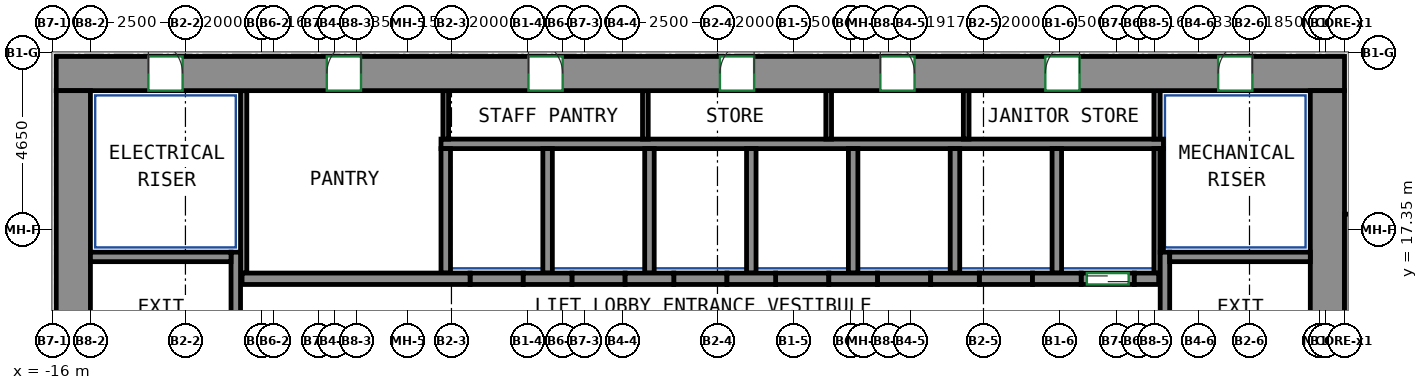
"""IFC4 building model, lengths in metres.
Left out: names, types, materials, properties, quantities, classifications, styles, units other than length and angle.
Written with IfcOpenShell. Run it as: python <this file> out.ifc"""

import sys

from ifc_helpers import new_model, si_unit, direction, frame, frame_2d, origin, place, context, subcontext, project, spatial, rectangle, extrude, source, transform, mapped, element, fill, save


model = new_model("IFC4")
c1 = context("Model", 3, precision=1e-05, world=origin(), true_north=direction((0.0, 1.0)))
c2 = subcontext(c1, "Body", "Model", "MODEL_VIEW")
j1 = project(units=[si_unit("LENGTHUNIT", "METRE"), si_unit("PLANEANGLEUNIT", "RADIAN")], contexts=[c1])
p1 = place(None, origin())
s1 = spatial("IfcSite", under=j1, at=p1, CompositionType="ELEMENT")
p2 = place(p1, origin())
s2 = spatial("IfcBuilding", under=s1, at=p2, CompositionType="ELEMENT")
p3 = place(p2, frame((0.0, 0.0, 120.6)))
s3 = spatial("IfcBuildingStorey", under=s2, at=p3, CompositionType="ELEMENT", Elevation=120.6)
m1 = source(origin(), c2, "Body", "SweptSolid", [
    extrude(rectangle(XDim=33.9, YDim=0.9, at=frame_2d((16.95, 0.0))), origin(), (0.0, 0.0, 1.0), 3.72),
])
p4 = place(p3, frame((-15.9, 21.45, 0.0), z_axis=(0.0, 0.0, 1.0), x_axis=(1.0, 0.0, 0.0)))
e1 = element("IfcWall", 1, at=p4, inside=s3, PredefinedType="SHEAR", context=c2, shape_type="MappedRepresentation", body=[
    mapped(m1, transform((0.0, 0.0, 0.0))),
])
p5 = place(p4, frame((7.12, 0.0, 0.0)))
e2 = element("IfcOpeningElement", 2, at=p5, cuts=e1, PredefinedType="OPENING", context=c2, shape_type="SweptSolid", body=[
    extrude(rectangle(XDim=0.9, YDim=2.1, at=frame_2d((0.45, 1.05))), frame((0.0, 0.46, 0.0), z_axis=(0.0, -1.0, 0.0), x_axis=(1.0, 0.0, 0.0)), (0.0, 0.0, 1.0), 0.92),
])
p6 = place(p4, frame((12.427, 0.0, 0.0)))
e3 = element("IfcOpeningElement", 3, at=p6, cuts=e1, PredefinedType="OPENING", context=c2, shape_type="SweptSolid", body=[
    extrude(rectangle(XDim=0.9, YDim=2.1, at=frame_2d((0.45, 1.05))), frame((0.0, 0.46, 0.0), z_axis=(0.0, -1.0, 0.0), x_axis=(1.0, 0.0, 0.0)), (0.0, 0.0, 1.0), 0.92),
])
p7 = place(p4, frame((17.465, 0.0, 0.0)))
e4 = element("IfcOpeningElement", 4, at=p7, cuts=e1, PredefinedType="OPENING", context=c2, shape_type="SweptSolid", body=[
    extrude(rectangle(XDim=0.9, YDim=2.1, at=frame_2d((0.45, 1.05))), frame((0.0, 0.46, 0.0), z_axis=(0.0, -1.0, 0.0), x_axis=(1.0, 0.0, 0.0)), (0.0, 0.0, 1.0), 0.92),
])
p8 = place(p4, frame((21.686, 0.0, 0.0)))
e5 = element("IfcOpeningElement", 5, at=p8, cuts=e1, PredefinedType="OPENING", context=c2, shape_type="SweptSolid", body=[
    extrude(rectangle(XDim=0.9, YDim=2.1, at=frame_2d((0.45, 1.05))), frame((0.0, 0.46, 0.0), z_axis=(0.0, -1.0, 0.0), x_axis=(1.0, 0.0, 0.0)), (0.0, 0.0, 1.0), 0.92),
])
p9 = place(p4, frame((26.027, 0.0, 0.0)))
e6 = element("IfcOpeningElement", 6, at=p9, cuts=e1, PredefinedType="OPENING", context=c2, shape_type="SweptSolid", body=[
    extrude(rectangle(XDim=0.9, YDim=2.1, at=frame_2d((0.45, 1.05))), frame((0.0, 0.46, 0.0), z_axis=(0.0, -1.0, 0.0), x_axis=(1.0, 0.0, 0.0)), (0.0, 0.0, 1.0), 0.92),
])
p10 = place(p4, frame((2.425, 0.0, 0.0)))
e7 = element("IfcOpeningElement", 7, at=p10, cuts=e1, PredefinedType="OPENING", context=c2, shape_type="SweptSolid", body=[
    extrude(rectangle(XDim=0.9, YDim=2.1, at=frame_2d((0.45, 1.05))), frame((0.0, 0.46, 0.0), z_axis=(0.0, -1.0, 0.0), x_axis=(1.0, 0.0, 0.0)), (0.0, 0.0, 1.0), 0.92),
])
p11 = place(p4, frame((30.575, 0.0, 0.0)))
e8 = element("IfcOpeningElement", 8, at=p11, cuts=e1, PredefinedType="OPENING", context=c2, shape_type="SweptSolid", body=[
    extrude(rectangle(XDim=0.9, YDim=2.1, at=frame_2d((0.45, 1.05))), frame((0.0, 0.46, 0.0), z_axis=(0.0, -1.0, 0.0), x_axis=(1.0, 0.0, 0.0)), (0.0, 0.0, 1.0), 0.92),
])
m2 = source(origin(), c2, "Body", "SweptSolid", [
    extrude(rectangle(XDim=12.0, YDim=0.9, at=frame_2d((6.0, 0.0))), origin(), (0.0, 0.0, 1.0), 3.72),
])
for number, where, z_axis, x_axis in (
    (9, (-15.45, 9.0, 0.0), (0.0, 0.0, 1.0), (0.0, 1.0, 0.0)),
    (10, (17.55, 9.0, 0.0), (0.0, 0.0, 1.0), (0.0, 1.0, 0.0)),
):
    element("IfcWall", number, at=place(p3, frame(where, z_axis=z_axis, x_axis=x_axis)), inside=s3, PredefinedType="SHEAR", context=c2, shape_type="MappedRepresentation", body=[
        mapped(m2, transform((0.0, 0.0, 0.0))),
    ])
m3 = source(origin(), c2, "Body", "SweptSolid", [
    extrude(rectangle(XDim=7.75, YDim=0.25, at=frame_2d((3.875, 0.0))), origin(), (0.0, 0.0, 1.0), 3.72),
])
p12 = place(p3, frame((-11.175, 9.0, 0.0), z_axis=(0.0, 0.0, 1.0), x_axis=(0.0, 1.0, 0.0)))
e11 = element("IfcWall", 11, at=p12, inside=s3, PredefinedType="SHEAR", context=c2, shape_type="MappedRepresentation", body=[
    mapped(m3, transform((0.0, 0.0, 0.0))),
])
m4 = source(origin(), c2, "Body", "SweptSolid", [
    extrude(rectangle(XDim=3.7, YDim=0.25, at=frame_2d((1.85, 0.0))), origin(), (0.0, 0.0, 1.0), 3.72),
])
p13 = place(p3, frame((-15.0, 16.625, 0.0), z_axis=(0.0, 0.0, 1.0), x_axis=(1.0, 0.0, 0.0)))
e12 = element("IfcWall", 12, at=p13, inside=s3, PredefinedType="SHEAR", context=c2, shape_type="MappedRepresentation", body=[
    mapped(m4, transform((0.0, 0.0, 0.0))),
])
p14 = place(p3, frame((13.275, 9.0, 0.0), z_axis=(0.0, 0.0, 1.0), x_axis=(0.0, 1.0, 0.0)))
e13 = element("IfcWall", 13, at=p14, inside=s3, PredefinedType="SHEAR", context=c2, shape_type="MappedRepresentation", body=[
    mapped(m3, transform((0.0, 0.0, 0.0))),
])
m5 = source(origin(), c2, "Body", "SweptSolid", [
    extrude(rectangle(XDim=3.7, YDim=0.25, at=frame_2d((1.85, 0.0))), origin(), (0.0, 0.0, 1.0), 3.72),
])
p15 = place(p3, frame((13.4, 16.625, 0.0), z_axis=(0.0, 0.0, 1.0), x_axis=(1.0, 0.0, 0.0)))
e14 = element("IfcWall", 14, at=p15, inside=s3, PredefinedType="SHEAR", context=c2, shape_type="MappedRepresentation", body=[
    mapped(m5, transform((0.0, 0.0, 0.0))),
])
m6 = source(origin(), c2, "Body", "SweptSolid", [
    extrude(rectangle(XDim=8.0, YDim=0.35, at=frame_2d((4.0, 0.0))), origin(), (0.0, 0.0, 1.0), 3.72),
])
p16 = place(p3, frame((18.175, 9.75, 0.0), z_axis=(0.0, 0.0, 1.0), x_axis=(0.0, 1.0, 0.0)))
e15 = element("IfcWall", 15, at=p16, inside=s3, PredefinedType="SHEAR", context=c2, shape_type="MappedRepresentation", body=[
    mapped(m6, transform((0.0, 0.0, 0.0))),
])
m7 = source(origin(), c2, "Body", "SweptSolid", [
    extrude(rectangle(XDim=6.0, YDim=0.3, at=frame_2d((3.0, 0.0))), origin(), (0.0, 0.0, 1.0), 3.72),
])
p17 = place(p3, frame((-11.01, 16.05, 0.0), z_axis=(0.0, 0.0, 1.0), x_axis=(1.0, 0.0, 0.0)))
e16 = element("IfcWall", 16, at=p17, inside=s3, PredefinedType="SHEAR", context=c2, shape_type="MappedRepresentation", body=[
    mapped(m7, transform((0.0, 0.0, 0.0))),
])
m8 = source(origin(), c2, "Body", "SweptSolid", [
    extrude(rectangle(XDim=1.28, YDim=0.3, at=frame_2d((0.64, 0.0))), origin(), (0.0, 0.0, 1.0), 3.72),
])
for number, where, z_axis, x_axis in (
    (17, (-3.61, 16.05, 0.0), (0.0, 0.0, 1.0), (1.0, 0.0, 0.0)),
    (18, (-0.93, 16.05, 0.0), (0.0, 0.0, 1.0), (1.0, 0.0, 0.0)),
    (19, (1.75, 16.05, 0.0), (0.0, 0.0, 1.0), (1.0, 0.0, 0.0)),
    (20, (4.43, 16.05, 0.0), (0.0, 0.0, 1.0), (1.0, 0.0, 0.0)),
):
    element("IfcWall", number, at=place(p3, frame(where, z_axis=z_axis, x_axis=x_axis)), inside=s3, PredefinedType="SHEAR", context=c2, shape_type="MappedRepresentation", body=[
        mapped(m8, transform((0.0, 0.0, 0.0))),
    ])
m9 = source(origin(), c2, "Body", "SweptSolid", [
    extrude(rectangle(XDim=1.28, YDim=0.3, at=frame_2d((0.64, 0.0))), origin(), (0.0, 0.0, 1.0), 3.72),
])
p18 = place(p3, frame((7.11, 16.05, 0.0), z_axis=(0.0, 0.0, 1.0), x_axis=(1.0, 0.0, 0.0)))
e21 = element("IfcWall", 21, at=p18, inside=s3, PredefinedType="SHEAR", context=c2, shape_type="MappedRepresentation", body=[
    mapped(m9, transform((0.0, 0.0, 0.0))),
])
p19 = place(p3, frame((9.79, 16.05, 0.0), z_axis=(0.0, 0.0, 1.0), x_axis=(1.0, 0.0, 0.0)))
e22 = element("IfcWall", 22, at=p19, inside=s3, PredefinedType="SHEAR", context=c2, shape_type="MappedRepresentation", body=[
    mapped(m8, transform((0.0, 0.0, 0.0))),
])
m10 = source(origin(), c2, "Body", "SweptSolid", [
    extrude(rectangle(XDim=0.64, YDim=0.3, at=frame_2d((0.32, 0.0))), origin(), (0.0, 0.0, 1.0), 3.72),
])
p20 = place(p3, frame((12.47, 16.05, 0.0), z_axis=(0.0, 0.0, 1.0), x_axis=(1.0, 0.0, 0.0)))
e23 = element("IfcWall", 23, at=p20, inside=s3, PredefinedType="SHEAR", context=c2, shape_type="MappedRepresentation", body=[
    mapped(m10, transform((0.0, 0.0, 0.0))),
])
m11 = source(origin(), c2, "Body", "SweptSolid", [
    extrude(rectangle(XDim=1.4, YDim=0.3, at=frame_2d((0.7, 0.0))), origin(), (0.0, 0.0, 1.0), 3.72),
])
p21 = place(p3, frame((11.07, 16.05, 0.0), z_axis=(0.0, 0.0, 1.0), x_axis=(1.0, 0.0, 0.0)))
e24 = element("IfcWall", 24, at=p21, inside=s3, PredefinedType="PARTITIONING", context=c2, shape_type="MappedRepresentation", body=[
    mapped(m11, transform((0.0, 0.0, 0.0))),
])
p22 = place(p21, frame((0.15, 0.0, 0.0)))
e25 = element("IfcOpeningElement", 25, at=p22, cuts=e24, PredefinedType="OPENING", context=c2, shape_type="SweptSolid", body=[
    extrude(rectangle(XDim=1.1, YDim=2.1, at=frame_2d((0.55, 1.05))), frame((0.0, 0.16, 0.0), z_axis=(0.0, -1.0, 0.0), x_axis=(1.0, 0.0, 0.0)), (0.0, 0.0, 1.0), 0.32),
])
p23 = place(p3, frame((-5.01, 16.05, 0.0), z_axis=(0.0, 0.0, 1.0), x_axis=(1.0, 0.0, 0.0)))
e26 = element("IfcWall", 26, at=p23, inside=s3, PredefinedType="PARTITIONING", context=c2, shape_type="MappedRepresentation", body=[
    mapped(m11, transform((0.0, 0.0, 0.0))),
])
m12 = source(origin(), c2, "Body", "SweptSolid", [
    extrude(rectangle(XDim=1.4, YDim=0.3, at=frame_2d((0.7, 0.0))), origin(), (0.0, 0.0, 1.0), 3.72),
])
p24 = place(p3, frame((-2.33, 16.05, 0.0), z_axis=(0.0, 0.0, 1.0), x_axis=(1.0, 0.0, 0.0)))
e27 = element("IfcWall", 27, at=p24, inside=s3, PredefinedType="PARTITIONING", context=c2, shape_type="MappedRepresentation", body=[
    mapped(m12, transform((0.0, 0.0, 0.0))),
])
for number, where, z_axis, x_axis in (
    (28, (0.35, 16.05, 0.0), (0.0, 0.0, 1.0), (1.0, 0.0, 0.0)),
    (29, (3.03, 16.05, 0.0), (0.0, 0.0, 1.0), (1.0, 0.0, 0.0)),
):
    element("IfcWall", number, at=place(p3, frame(where, z_axis=z_axis, x_axis=x_axis)), inside=s3, PredefinedType="PARTITIONING", context=c2, shape_type="MappedRepresentation", body=[
        mapped(m11, transform((0.0, 0.0, 0.0))),
    ])
for number, where, z_axis, x_axis in (
    (30, (5.71, 16.05, 0.0), (0.0, 0.0, 1.0), (1.0, 0.0, 0.0)),
    (31, (8.39, 16.05, 0.0), (0.0, 0.0, 1.0), (1.0, 0.0, 0.0)),
):
    element("IfcWall", number, at=place(p3, frame(where, z_axis=z_axis, x_axis=x_axis)), inside=s3, PredefinedType="PARTITIONING", context=c2, shape_type="MappedRepresentation", body=[
        mapped(m12, transform((0.0, 0.0, 0.0))),
    ])
m13 = source(origin(), c2, "Body", "SweptSolid", [
    extrude(rectangle(XDim=19.01, YDim=0.25, at=frame_2d((9.505, 0.0))), origin(), (0.0, 0.0, 1.0), 3.72),
])
p25 = place(p3, frame((-5.775, 19.6, 0.0), z_axis=(0.0, 0.0, 1.0), x_axis=(1.0, 0.0, 0.0)))
e32 = element("IfcWall", 32, at=p25, inside=s3, PredefinedType="PARTITIONING", context=c2, shape_type="MappedRepresentation", body=[
    mapped(m13, transform((0.0, 0.0, 0.0))),
])
m14 = source(origin(), c2, "Body", "SweptSolid", [
    extrude(rectangle(XDim=3.275, YDim=0.165, at=frame_2d((1.638, 0.0))), origin(), (0.0, 0.0, 1.0), 3.72),
])
p26 = place(p3, frame((13.067, 16.2, 0.0), z_axis=(0.0, 0.0, 1.0), x_axis=(0.0, 1.0, 0.0)))
e33 = element("IfcWall", 33, at=p26, inside=s3, PredefinedType="PARTITIONING", context=c2, shape_type="MappedRepresentation", body=[
    mapped(m14, transform((0.0, 0.0, 0.0))),
])
m15 = source(origin(), c2, "Body", "SweptSolid", [
    extrude(rectangle(XDim=1.275, YDim=0.165, at=frame_2d((0.637, 0.0))), origin(), (0.0, 0.0, 1.0), 3.72),
])
p27 = place(p3, frame((13.067, 19.725, 0.0), z_axis=(0.0, 0.0, 1.0), x_axis=(0.0, 1.0, 0.0)))
e34 = element("IfcWall", 34, at=p27, inside=s3, PredefinedType="PARTITIONING", context=c2, shape_type="MappedRepresentation", body=[
    mapped(m15, transform((0.0, 0.0, 0.0))),
])
m16 = source(origin(), c2, "Body", "SweptSolid", [
    extrude(rectangle(XDim=4.8, YDim=0.165, at=frame_2d((2.4, 0.0))), origin(), (0.0, 0.0, 1.0), 3.72),
])
p28 = place(p3, frame((-10.968, 16.2, 0.0), z_axis=(0.0, 0.0, 1.0), x_axis=(0.0, 1.0, 0.0)))
e35 = element("IfcWall", 35, at=p28, inside=s3, PredefinedType="PARTITIONING", context=c2, shape_type="MappedRepresentation", body=[
    mapped(m16, transform((0.0, 0.0, 0.0))),
])
m17 = source(origin(), c2, "Body", "SweptSolid", [
    extrude(rectangle(XDim=3.275, YDim=0.25, at=frame_2d((1.638, 0.0))), origin(), (0.0, 0.0, 1.0), 3.72),
])
p29 = place(p3, frame((10.43, 16.2, 0.0), z_axis=(0.0, 0.0, 1.0), x_axis=(0.0, 1.0, 0.0)))
e36 = element("IfcWall", 36, at=p29, inside=s3, PredefinedType="PARTITIONING", context=c2, shape_type="MappedRepresentation", body=[
    mapped(m17, transform((0.0, 0.0, 0.0))),
])
m18 = source(origin(), c2, "Body", "SweptSolid", [
    extrude(rectangle(XDim=2.725, YDim=0.085, at=frame_2d((1.363, 0.0))), origin(), (0.0, 0.0, 1.0), 3.72),
])
p30 = place(p3, frame((13.192, 16.75, 0.0), z_axis=(0.0, 0.0, 1.0), x_axis=(0.0, 1.0, 0.0)))
e37 = element("IfcWall", 37, at=p30, inside=s3, PredefinedType="PARTITIONING", context=c2, shape_type="MappedRepresentation", body=[
    mapped(m18, transform((0.0, 0.0, 0.0))),
])
for number, where, z_axis, x_axis in (
    (38, (2.39, 16.2, 0.0), (0.0, 0.0, 1.0), (0.0, 1.0, 0.0)),
    (39, (5.07, 16.2, 0.0), (0.0, 0.0, 1.0), (0.0, 1.0, 0.0)),
    (40, (7.75, 16.2, 0.0), (0.0, 0.0, 1.0), (0.0, 1.0, 0.0)),
    (41, (-0.29, 16.2, 0.0), (0.0, 0.0, 1.0), (0.0, 1.0, 0.0)),
    (42, (-2.97, 16.2, 0.0), (0.0, 0.0, 1.0), (0.0, 1.0, 0.0)),
    (43, (-5.65, 16.2, 0.0), (0.0, 0.0, 1.0), (0.0, 1.0, 0.0)),
):
    element("IfcWall", number, at=place(p3, frame(where, z_axis=z_axis, x_axis=x_axis)), inside=s3, PredefinedType="PARTITIONING", context=c2, shape_type="MappedRepresentation", body=[
        mapped(m17, transform((0.0, 0.0, 0.0))),
    ])
m19 = source(origin(), c2, "Body", "SweptSolid", [
    extrude(rectangle(XDim=1.275, YDim=0.15, at=frame_2d((0.637, 0.0))), origin(), (0.0, 0.0, 1.0), 3.72),
])
for number, where, z_axis, x_axis in (
    (44, (-5.65, 19.725, 0.0), (0.0, 0.0, 1.0), (0.0, 1.0, 0.0)),
    (45, (-0.397, 19.725, 0.0), (0.0, 0.0, 1.0), (0.0, 1.0, 0.0)),
    (46, (4.427, 19.725, 0.0), (0.0, 0.0, 1.0), (0.0, 1.0, 0.0)),
    (47, (8.045, 19.725, 0.0), (0.0, 0.0, 1.0), (0.0, 1.0, 0.0)),
):
    element("IfcWall", number, at=place(p3, frame(where, z_axis=z_axis, x_axis=x_axis)), inside=s3, PredefinedType="PARTITIONING", context=c2, shape_type="MappedRepresentation", body=[
        mapped(m19, transform((0.0, 0.0, 0.0))),
    ])
p31 = place(p22, origin())
e48 = element("IfcDoor", 48, at=p31, inside=s3, OperationType="DOUBLE_DOOR_SLIDING", PredefinedType="DOOR", context=c2, shape_type="SweptSolid", body=[
    extrude(rectangle(XDim=1.1, YDim=2.1, at=frame_2d((0.55, 1.05))), frame((0.0, 0.025, 0.0), z_axis=(0.0, -1.0, 0.0), x_axis=(1.0, 0.0, 0.0)), (0.0, 0.0, 1.0), 0.05),
])
fill(e25, e48)
p32 = place(p5, origin())
e49 = element("IfcDoor", 49, at=p32, inside=s3, OperationType="SINGLE_SWING_RIGHT", PredefinedType="DOOR", context=c2, shape_type="SweptSolid", body=[
    extrude(rectangle(XDim=0.9, YDim=2.1, at=frame_2d((0.45, 1.05))), frame((0.0, -0.305, 0.0), z_axis=(0.0, -1.0, 0.0), x_axis=(1.0, 0.0, 0.0)), (0.0, 0.0, 1.0), 0.05),
])
fill(e2, e49)
p33 = place(p6, origin())
e50 = element("IfcDoor", 50, at=p33, inside=s3, OperationType="SINGLE_SWING_LEFT", PredefinedType="DOOR", context=c2, shape_type="SweptSolid", body=[
    extrude(rectangle(XDim=0.9, YDim=2.1, at=frame_2d((0.45, 1.05))), frame((0.0, -0.305, 0.0), z_axis=(0.0, -1.0, 0.0), x_axis=(1.0, 0.0, 0.0)), (0.0, 0.0, 1.0), 0.05),
])
fill(e3, e50)
p34 = place(p7, origin())
e51 = element("IfcDoor", 51, at=p34, inside=s3, OperationType="SINGLE_SWING_RIGHT", PredefinedType="DOOR", context=c2, shape_type="SweptSolid", body=[
    extrude(rectangle(XDim=0.9, YDim=2.1, at=frame_2d((0.45, 1.05))), frame((0.0, -0.305, 0.0), z_axis=(0.0, -1.0, 0.0), x_axis=(1.0, 0.0, 0.0)), (0.0, 0.0, 1.0), 0.05),
])
fill(e4, e51)
p35 = place(p8, origin())
e52 = element("IfcDoor", 52, at=p35, inside=s3, OperationType="SINGLE_SWING_LEFT", PredefinedType="DOOR", context=c2, shape_type="SweptSolid", body=[
    extrude(rectangle(XDim=0.9, YDim=2.1, at=frame_2d((0.45, 1.05))), frame((0.0, -0.305, 0.0), z_axis=(0.0, -1.0, 0.0), x_axis=(1.0, 0.0, 0.0)), (0.0, 0.0, 1.0), 0.05),
])
fill(e5, e52)
p36 = place(p9, origin())
e53 = element("IfcDoor", 53, at=p36, inside=s3, OperationType="SINGLE_SWING_RIGHT", PredefinedType="DOOR", context=c2, shape_type="SweptSolid", body=[
    extrude(rectangle(XDim=0.9, YDim=2.1, at=frame_2d((0.45, 1.05))), frame((0.0, -0.305, 0.0), z_axis=(0.0, -1.0, 0.0), x_axis=(1.0, 0.0, 0.0)), (0.0, 0.0, 1.0), 0.05),
])
fill(e6, e53)
p37 = place(p10, origin())
e54 = element("IfcDoor", 54, at=p37, inside=s3, OperationType="SINGLE_SWING_LEFT", PredefinedType="DOOR", context=c2, shape_type="SweptSolid", body=[
    extrude(rectangle(XDim=0.9, YDim=2.1, at=frame_2d((0.45, 1.05))), frame((0.0, -0.305, 0.0), z_axis=(0.0, -1.0, 0.0), x_axis=(1.0, 0.0, 0.0)), (0.0, 0.0, 1.0), 0.05),
])
fill(e7, e54)
p38 = place(p11, origin())
e55 = element("IfcDoor", 55, at=p38, inside=s3, OperationType="SINGLE_SWING_RIGHT", PredefinedType="DOOR", context=c2, shape_type="SweptSolid", body=[
    extrude(rectangle(XDim=0.9, YDim=2.1, at=frame_2d((0.45, 1.05))), frame((0.0, -0.305, 0.0), z_axis=(0.0, -1.0, 0.0), x_axis=(1.0, 0.0, 0.0)), (0.0, 0.0, 1.0), 0.05),
])
fill(e8, e55)
save(model, sys.argv[1])
